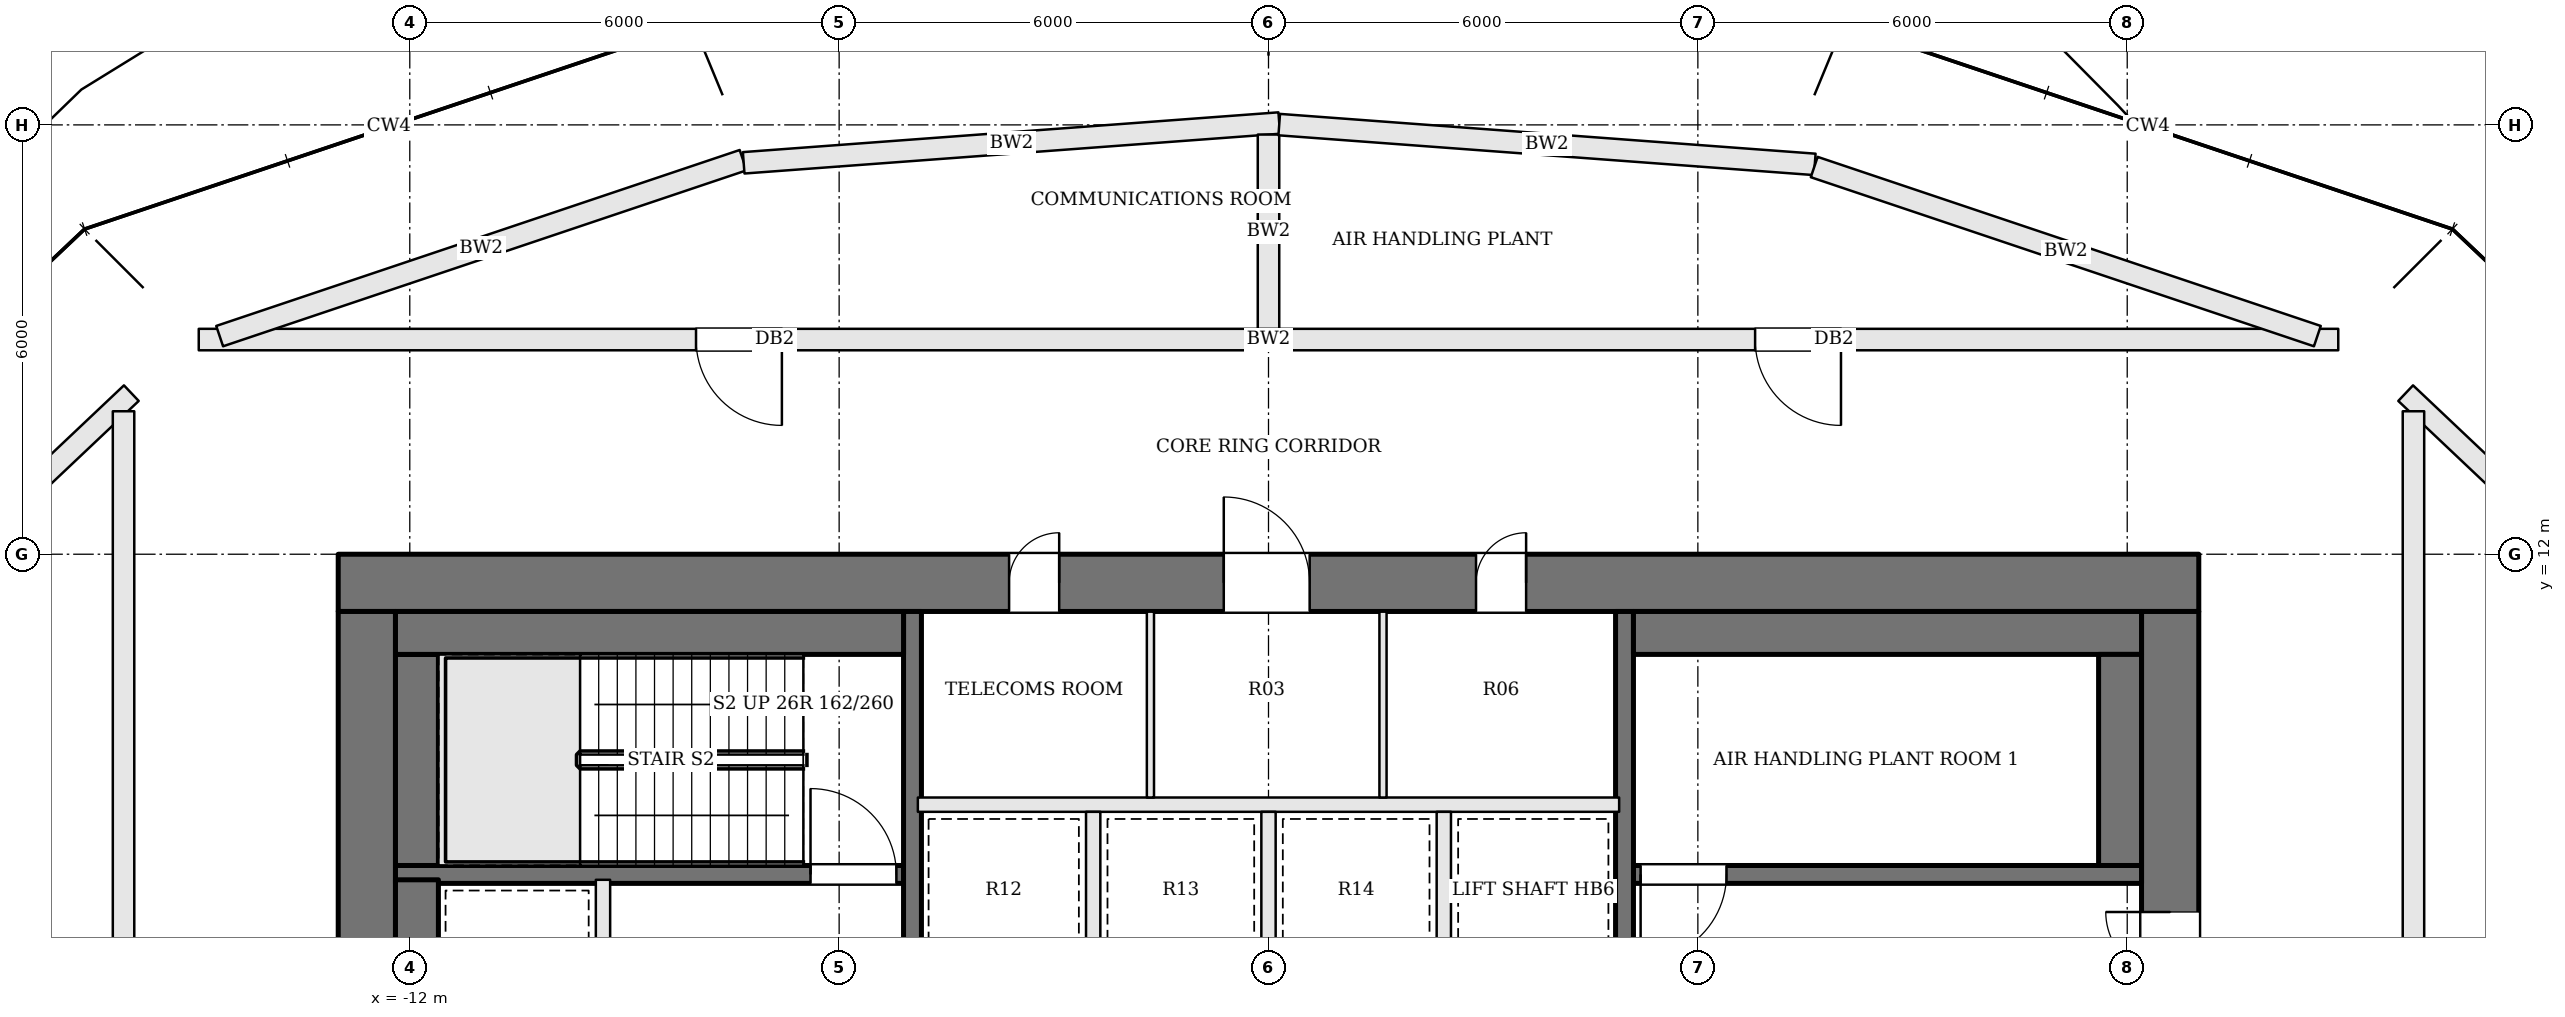
"""IFC4 building model, lengths in metres.
Left out: names, types, materials, properties, quantities, classifications, styles, units other than length and angle.
Written with IfcOpenShell. Run it as: python <this file> out.ifc"""

import sys

from ifc_helpers import new_model, si_unit, direction, frame, frame_2d, origin, place, context, subcontext, project, spatial, rectangle, extrude, element, fill, save


model = new_model("IFC4")
c1 = context("Model", 3, precision=1e-05, world=origin(), true_north=direction((0.0, 1.0)))
c2 = subcontext(c1, "Body", "Model", "MODEL_VIEW")
j1 = project(units=[si_unit("LENGTHUNIT", "METRE"), si_unit("PLANEANGLEUNIT", "RADIAN")], contexts=[c1])
p1 = place(None, origin())
s1 = spatial("IfcSite", under=j1, at=p1, CompositionType="ELEMENT")
p2 = place(p1, origin())
s2 = spatial("IfcBuilding", under=s1, at=p2, CompositionType="ELEMENT")
p3 = place(p2, frame((0.0, 0.0, 307.8)))
s3 = spatial("IfcBuildingStorey", under=s2, at=p3, CompositionType="ELEMENT", Elevation=307.8)
p4 = place(p3, frame((-13.0, 11.6, 0.0), z_axis=(0.0, 0.0, 1.0), x_axis=(1.0, 0.0, 0.0)))
e1 = element("IfcWall", 1, at=p4, inside=s3, PredefinedType="SHEAR", context=c2, shape_type="SweptSolid", body=[
    extrude(rectangle(XDim=26.0, YDim=0.8, at=frame_2d((13.0, 0.0))), origin(), (0.0, 0.0, 1.0), 4.2),
])
p5 = place(p4, frame((9.375, 0.0, 0.0)))
e2 = element("IfcOpeningElement", 2, at=p5, cuts=e1, PredefinedType="OPENING", context=c2, shape_type="SweptSolid", body=[
    extrude(rectangle(XDim=0.7, YDim=2.1, at=frame_2d((0.35, 1.05))), frame((0.0, 0.41, 0.0), z_axis=(0.0, -1.0, 0.0), x_axis=(1.0, 0.0, 0.0)), (0.0, 0.0, 1.0), 0.82),
])
p6 = place(p4, frame((12.375, 0.0, 0.0)))
e3 = element("IfcOpeningElement", 3, at=p6, cuts=e1, PredefinedType="OPENING", context=c2, shape_type="SweptSolid", body=[
    extrude(rectangle(XDim=1.2, YDim=2.1, at=frame_2d((0.6, 1.05))), frame((0.0, 0.41, 0.0), z_axis=(0.0, -1.0, 0.0), x_axis=(1.0, 0.0, 0.0)), (0.0, 0.0, 1.0), 0.82),
])
p7 = place(p4, frame((15.9, 0.0, 0.0)))
e4 = element("IfcOpeningElement", 4, at=p7, cuts=e1, PredefinedType="OPENING", context=c2, shape_type="SweptSolid", body=[
    extrude(rectangle(XDim=0.7, YDim=2.1, at=frame_2d((0.35, 1.05))), frame((0.0, 0.41, 0.0), z_axis=(0.0, -1.0, 0.0), x_axis=(1.0, 0.0, 0.0)), (0.0, 0.0, 1.0), 0.82),
])
p8 = place(p3, frame((12.6, -2.2, 0.0), z_axis=(0.0, 0.0, 1.0), x_axis=(0.0, 1.0, 0.0)))
e5 = element("IfcWall", 5, at=p8, inside=s3, PredefinedType="SHEAR", context=c2, shape_type="SweptSolid", body=[
    extrude(rectangle(XDim=13.4, YDim=0.8, at=frame_2d((6.7, 0.0))), origin(), (0.0, 0.0, 1.0), 4.2),
])
p9 = place(p8, frame((7.4, 0.0, 0.0)))
e6 = element("IfcOpeningElement", 6, at=p9, cuts=e5, PredefinedType="OPENING", context=c2, shape_type="SweptSolid", body=[
    extrude(rectangle(XDim=1.8, YDim=2.1, at=frame_2d((0.9, 1.05))), frame((0.0, 0.41, 0.0), z_axis=(0.0, -1.0, 0.0), x_axis=(1.0, 0.0, 0.0)), (0.0, 0.0, 1.0), 0.82),
])
p10 = place(p3, frame((-12.6, -2.2, 0.0), z_axis=(0.0, 0.0, 1.0), x_axis=(0.0, 1.0, 0.0)))
e7 = element("IfcWall", 7, at=p10, inside=s3, PredefinedType="SHEAR", context=c2, shape_type="SweptSolid", body=[
    extrude(rectangle(XDim=13.4, YDim=0.8, at=frame_2d((6.7, 0.0))), origin(), (0.0, 0.0, 1.0), 4.2),
])
p11 = place(p10, frame((4.2, 0.0, 0.0)))
e8 = element("IfcOpeningElement", 8, at=p11, cuts=e7, PredefinedType="OPENING", context=c2, shape_type="SweptSolid", body=[
    extrude(rectangle(XDim=1.8, YDim=2.1, at=frame_2d((0.9, 1.05))), frame((0.0, 0.41, 0.0), z_axis=(0.0, -1.0, 0.0), x_axis=(1.0, 0.0, 0.0)), (0.0, 0.0, 1.0), 0.82),
])
p12 = place(p3, frame((12.2, 7.525, 0.0), z_axis=(0.0, 0.0, 1.0), x_axis=(-1.0, 0.0, 0.0)))
e9 = element("IfcWall", 9, at=p12, inside=s3, PredefinedType="SOLIDWALL", context=c2, shape_type="SweptSolid", body=[
    extrude(rectangle(XDim=7.1, YDim=0.25, at=frame_2d((3.55, 0.0))), origin(), (0.0, 0.0, 1.0), 4.0),
])
p13 = place(p12, frame((5.8, 0.0, 0.0)))
e10 = element("IfcOpeningElement", 10, at=p13, cuts=e9, PredefinedType="OPENING", context=c2, shape_type="SweptSolid", body=[
    extrude(rectangle(XDim=1.2, YDim=2.1, at=frame_2d((0.6, 1.05))), frame((0.0, 0.135, 0.0), z_axis=(0.0, -1.0, 0.0), x_axis=(1.0, 0.0, 0.0)), (0.0, 0.0, 1.0), 0.27),
])
p14 = place(p3, frame((-12.2, 7.525, 0.0), z_axis=(0.0, 0.0, 1.0), x_axis=(1.0, 0.0, 0.0)))
e11 = element("IfcWall", 11, at=p14, inside=s3, PredefinedType="SOLIDWALL", context=c2, shape_type="SweptSolid", body=[
    extrude(rectangle(XDim=7.1, YDim=0.25, at=frame_2d((3.55, 0.0))), origin(), (0.0, 0.0, 1.0), 4.0),
])
p15 = place(p14, frame((5.8, 0.0, 0.0)))
e12 = element("IfcOpeningElement", 12, at=p15, cuts=e11, PredefinedType="OPENING", context=c2, shape_type="SweptSolid", body=[
    extrude(rectangle(XDim=1.2, YDim=2.1, at=frame_2d((0.6, 1.05))), frame((0.0, 0.135, 0.0), z_axis=(0.0, -1.0, 0.0), x_axis=(1.0, 0.0, 0.0)), (0.0, 0.0, 1.0), 0.27),
])
p16 = place(p3, frame((-9.3, 4.45, 0.0), z_axis=(0.0, 0.0, 1.0), x_axis=(0.0, 1.0, 0.0)))
e13 = element("IfcWall", 13, at=p16, inside=s3, PredefinedType="SOLIDWALL", context=c2, shape_type="SweptSolid", body=[
    extrude(rectangle(XDim=3.0, YDim=0.2, at=frame_2d((1.5, 0.0))), origin(), (0.0, 0.0, 1.0), 4.0),
])
p17 = place(p3, frame((-4.975, -2.2, 0.0), z_axis=(0.0, 0.0, 1.0), x_axis=(0.0, 1.0, 0.0)))
e14 = element("IfcWall", 14, at=p17, inside=s3, PredefinedType="SOLIDWALL", context=c2, shape_type="SweptSolid", body=[
    extrude(rectangle(XDim=13.4, YDim=0.25, at=frame_2d((6.7, 0.0))), origin(), (0.0, 0.0, 1.0), 4.0),
])
p18 = place(p17, frame((5.25, 0.0, 0.0)))
e15 = element("IfcOpeningElement", 15, at=p18, cuts=e14, PredefinedType="OPENING", context=c2, shape_type="SweptSolid", body=[
    extrude(rectangle(XDim=1.2, YDim=2.1, at=frame_2d((0.6, 1.05))), frame((0.0, 0.135, 0.0), z_axis=(0.0, -1.0, 0.0), x_axis=(1.0, 0.0, 0.0)), (0.0, 0.0, 1.0), 0.27),
])
p19 = place(p3, frame((4.975, 11.2, 0.0), z_axis=(0.0, 0.0, 1.0), x_axis=(0.0, -1.0, 0.0)))
e16 = element("IfcWall", 16, at=p19, inside=s3, PredefinedType="SOLIDWALL", context=c2, shape_type="SweptSolid", body=[
    extrude(rectangle(XDim=13.4, YDim=0.25, at=frame_2d((6.7, 0.0))), origin(), (0.0, 0.0, 1.0), 4.0),
])
p20 = place(p19, frame((5.25, 0.0, 0.0)))
e17 = element("IfcOpeningElement", 17, at=p20, cuts=e16, PredefinedType="OPENING", context=c2, shape_type="SweptSolid", body=[
    extrude(rectangle(XDim=1.2, YDim=2.1, at=frame_2d((0.6, 1.05))), frame((0.0, 0.135, 0.0), z_axis=(0.0, -1.0, 0.0), x_axis=(1.0, 0.0, 0.0)), (0.0, 0.0, 1.0), 0.27),
])
p21 = place(p3, frame((-11.9, 4.45, 0.0), z_axis=(0.0, 0.0, 1.0), x_axis=(0.0, 1.0, 0.0)))
e18 = element("IfcWall", 18, at=p21, inside=s3, PredefinedType="SOLIDWALL", context=c2, shape_type="SweptSolid", body=[
    extrude(rectangle(XDim=3.0, YDim=0.6, at=frame_2d((1.5, 0.0))), origin(), (0.0, 0.0, 1.0), 4.0),
])
p22 = place(p3, frame((-11.9, 7.65, 0.0), z_axis=(0.0, 0.0, 1.0), x_axis=(0.0, 1.0, 0.0)))
e19 = element("IfcWall", 19, at=p22, inside=s3, PredefinedType="SOLIDWALL", context=c2, shape_type="SweptSolid", body=[
    extrude(rectangle(XDim=2.95, YDim=0.6, at=frame_2d((1.475, 0.0))), origin(), (0.0, 0.0, 1.0), 4.0),
])
for number, where, z_axis, x_axis in (
    (20, (-12.2, 10.9, 0.0), (0.0, 0.0, 1.0), (1.0, 0.0, 0.0)),
    (21, (12.2, 10.9, 0.0), (0.0, 0.0, 1.0), (-1.0, 0.0, 0.0)),
):
    element("IfcWall", number, at=place(p3, frame(where, z_axis=z_axis, x_axis=x_axis)), inside=s3, PredefinedType="SOLIDWALL", context=c2, shape_type="SweptSolid", body=[
        extrude(rectangle(XDim=7.1, YDim=0.6, at=frame_2d((3.55, 0.0))), origin(), (0.0, 0.0, 1.0), 4.0),
    ])
p23 = place(p3, frame((11.9, 10.6, 0.0), z_axis=(0.0, 0.0, 1.0), x_axis=(0.0, -1.0, 0.0)))
e22 = element("IfcWall", 22, at=p23, inside=s3, PredefinedType="SOLIDWALL", context=c2, shape_type="SweptSolid", body=[
    extrude(rectangle(XDim=2.95, YDim=0.6, at=frame_2d((1.475, 0.0))), origin(), (0.0, 0.0, 1.0), 4.0),
])
p24 = place(p3, frame((-4.9, 8.5, 0.0), z_axis=(0.0, 0.0, 1.0), x_axis=(1.0, 0.0, 0.0)))
e23 = element("IfcWall", 23, at=p24, inside=s3, PredefinedType="SOLIDWALL", context=c2, shape_type="SweptSolid", body=[
    extrude(rectangle(XDim=9.8, YDim=0.2, at=frame_2d((4.9, 0.0))), origin(), (0.0, 0.0, 1.0), 4.0),
])
for number, where, z_axis, x_axis in (
    (24, (-2.45, 6.2, 0.0), (0.0, 0.0, 1.0), (0.0, 1.0, 0.0)),
    (25, (0.0, 6.2, 0.0), (0.0, 0.0, 1.0), (0.0, 1.0, 0.0)),
    (26, (2.45, 6.2, 0.0), (0.0, 0.0, 1.0), (0.0, 1.0, 0.0)),
):
    element("IfcWall", number, at=place(p3, frame(where, z_axis=z_axis, x_axis=x_axis)), inside=s3, PredefinedType="SOLIDWALL", context=c2, shape_type="SweptSolid", body=[
        extrude(rectangle(XDim=2.2, YDim=0.2, at=frame_2d((1.1, 0.0))), origin(), (0.0, 0.0, 1.0), 4.0),
    ])
for number, where, z_axis, x_axis in (
    (27, (-1.65, 8.6, 0.0), (0.0, 0.0, 1.0), (0.0, 1.0, 0.0)),
    (28, (1.6, 8.6, 0.0), (0.0, 0.0, 1.0), (0.0, 1.0, 0.0)),
):
    element("IfcWall", number, at=place(p3, frame(where, z_axis=z_axis, x_axis=x_axis)), inside=s3, PredefinedType="PARTITIONING", context=c2, shape_type="SweptSolid", body=[
        extrude(rectangle(XDim=2.6, YDim=0.1, at=frame_2d((1.3, 0.0))), origin(), (0.0, 0.0, 1.0), 4.0),
    ])
p25 = place(p3, frame((-21.552, 8.899, 0.0), z_axis=(0.0, 0.0, 1.0), x_axis=(0.726650636751, 0.687007170348, 0.0)))
e29 = element("IfcWall", 29, at=p25, inside=s3, PredefinedType="SOLIDWALL", context=c2, shape_type="SweptSolid", body=[
    extrude(rectangle(XDim=7.79, YDim=0.3, at=frame_2d((3.895, 0.0))), origin(), (0.0, 0.0, 1.0), 3.484),
])
p26 = place(p3, frame((-16.0, 13.998, 0.0), z_axis=(0.0, 0.0, 1.0), x_axis=(0.0, -1.0, 0.0)))
e30 = element("IfcWall", 30, at=p26, inside=s3, PredefinedType="SOLIDWALL", context=c2, shape_type="SweptSolid", body=[
    extrude(rectangle(XDim=19.848, YDim=0.3, at=frame_2d((9.924, 0.0))), origin(), (0.0, 0.0, 1.0), 3.484),
])
p27 = place(p26, frame((8.998, 0.0, 0.0)))
e31 = element("IfcOpeningElement", 31, at=p27, cuts=e30, PredefinedType="OPENING", context=c2, shape_type="SweptSolid", body=[
    extrude(rectangle(XDim=1.0, YDim=2.1, at=frame_2d((0.5, 1.05))), frame((0.0, 0.16, 0.0), z_axis=(0.0, -1.0, 0.0), x_axis=(1.0, 0.0, 0.0)), (0.0, 0.0, 1.0), 0.32),
])
p28 = place(p3, frame((15.891, 14.251, 0.0), z_axis=(0.0, 0.0, 1.0), x_axis=(0.726669936256, -0.686986756598, 0.0)))
e32 = element("IfcWall", 32, at=p28, inside=s3, PredefinedType="SOLIDWALL", context=c2, shape_type="SweptSolid", body=[
    extrude(rectangle(XDim=8.09, YDim=0.3, at=frame_2d((4.045, 0.0))), origin(), (0.0, 0.0, 1.0), 3.484),
])
p29 = place(p3, frame((16.0, -5.85, 0.0), z_axis=(0.0, 0.0, 1.0), x_axis=(0.0, 1.0, 0.0)))
e33 = element("IfcWall", 33, at=p29, inside=s3, PredefinedType="SOLIDWALL", context=c2, shape_type="SweptSolid", body=[
    extrude(rectangle(XDim=19.848, YDim=0.3, at=frame_2d((9.924, 0.0))), origin(), (0.0, 0.0, 1.0), 3.484),
])
p30 = place(p29, frame((9.85, 0.0, 0.0)))
e34 = element("IfcOpeningElement", 34, at=p30, cuts=e33, PredefinedType="OPENING", context=c2, shape_type="SweptSolid", body=[
    extrude(rectangle(XDim=1.0, YDim=2.1, at=frame_2d((0.5, 1.05))), frame((0.0, 0.16, 0.0), z_axis=(0.0, -1.0, 0.0), x_axis=(1.0, 0.0, 0.0)), (0.0, 0.0, 1.0), 0.32),
])
p31 = place(p3, frame((14.949, 15.0, 0.0), z_axis=(0.0, 0.0, 1.0), x_axis=(-1.0, 0.0, 0.0)))
e35 = element("IfcWall", 35, at=p31, inside=s3, PredefinedType="SOLIDWALL", context=c2, shape_type="SweptSolid", body=[
    extrude(rectangle(XDim=29.898, YDim=0.3, at=frame_2d((14.949, 0.0))), origin(), (0.0, 0.0, 1.0), 3.484),
])
p32 = place(p31, frame((21.749, 0.0, 0.0)))
e36 = element("IfcOpeningElement", 36, at=p32, cuts=e35, PredefinedType="OPENING", context=c2, shape_type="SweptSolid", body=[
    extrude(rectangle(XDim=1.2, YDim=2.1, at=frame_2d((0.6, 1.05))), frame((0.0, 0.16, 0.0), z_axis=(0.0, -1.0, 0.0), x_axis=(1.0, 0.0, 0.0)), (0.0, 0.0, 1.0), 0.32),
])
p33 = place(p31, frame((6.949, 0.0, 0.0)))
e37 = element("IfcOpeningElement", 37, at=p33, cuts=e35, PredefinedType="OPENING", context=c2, shape_type="SweptSolid", body=[
    extrude(rectangle(XDim=1.2, YDim=2.1, at=frame_2d((0.6, 1.05))), frame((0.0, 0.16, 0.0), z_axis=(0.0, -1.0, 0.0), x_axis=(1.0, 0.0, 0.0)), (0.0, 0.0, 1.0), 0.32),
])
p34 = place(p3, frame((-14.657, 15.048, 0.0), z_axis=(0.0, 0.0, 1.0), x_axis=(0.947876681806, 0.318637405352, 0.0)))
e38 = element("IfcWall", 38, at=p34, inside=s3, PredefinedType="SOLIDWALL", context=c2, shape_type="SweptSolid", body=[
    extrude(rectangle(XDim=7.717, YDim=0.3, at=frame_2d((3.859, 0.0))), origin(), (0.0, 0.0, 1.0), 3.484),
])
p35 = place(p3, frame((-7.334, 17.47, 0.0), z_axis=(0.0, 0.0, 1.0), x_axis=(0.99725255451, 0.074076599028, 0.0)))
e39 = element("IfcWall", 39, at=p35, inside=s3, PredefinedType="SOLIDWALL", context=c2, shape_type="SweptSolid", body=[
    extrude(rectangle(XDim=7.504, YDim=0.3, at=frame_2d((3.752, 0.0))), origin(), (0.0, 0.0, 1.0), 3.484),
])
p36 = place(p3, frame((0.0, 17.865, 0.0), z_axis=(0.0, 0.0, 1.0), x_axis=(0.0, -1.0, 0.0)))
e40 = element("IfcWall", 40, at=p36, inside=s3, PredefinedType="SOLIDWALL", context=c2, shape_type="SweptSolid", body=[
    extrude(rectangle(XDim=2.715, YDim=0.3, at=frame_2d((1.357, 0.0))), origin(), (0.0, 0.0, 1.0), 3.484),
])
p37 = place(p3, frame((0.15, 18.004, 0.0), z_axis=(0.0, 0.0, 1.0), x_axis=(0.997252733018, -0.074074195827, 0.0)))
e41 = element("IfcWall", 41, at=p37, inside=s3, PredefinedType="SOLIDWALL", context=c2, shape_type="SweptSolid", body=[
    extrude(rectangle(XDim=7.505, YDim=0.3, at=frame_2d((3.752, 0.0))), origin(), (0.0, 0.0, 1.0), 3.484),
])
p38 = place(p3, frame((7.626, 17.411, 0.0), z_axis=(0.0, 0.0, 1.0), x_axis=(0.947906967492, -0.318547297871, 0.0)))
e42 = element("IfcWall", 42, at=p38, inside=s3, PredefinedType="SOLIDWALL", context=c2, shape_type="SweptSolid", body=[
    extrude(rectangle(XDim=7.417, YDim=0.3, at=frame_2d((3.709, 0.0))), origin(), (0.0, 0.0, 1.0), 3.484),
])
p39 = place(p9, origin())
e43 = element("IfcDoor", 43, at=p39, inside=s3, OperationType="DOUBLE_DOOR_SINGLE_SWING", PredefinedType="DOOR", context=c2, shape_type="SweptSolid", body=[
    extrude(rectangle(XDim=1.8, YDim=2.1, at=frame_2d((0.9, 1.05))), frame((0.0, 0.025, 0.0), z_axis=(0.0, -1.0, 0.0), x_axis=(1.0, 0.0, 0.0)), (0.0, 0.0, 1.0), 0.05),
])
fill(e6, e43)
p40 = place(p13, origin())
e44 = element("IfcDoor", 44, at=p40, inside=s3, OperationType="SINGLE_SWING_RIGHT", PredefinedType="DOOR", context=c2, shape_type="SweptSolid", body=[
    extrude(rectangle(XDim=1.2, YDim=2.1, at=frame_2d((0.6, 1.05))), frame((0.0, 0.025, 0.0), z_axis=(0.0, -1.0, 0.0), x_axis=(1.0, 0.0, 0.0)), (0.0, 0.0, 1.0), 0.05),
])
fill(e10, e44)
p41 = place(p15, origin())
e45 = element("IfcDoor", 45, at=p41, inside=s3, OperationType="SINGLE_SWING_LEFT", PredefinedType="DOOR", context=c2, shape_type="SweptSolid", body=[
    extrude(rectangle(XDim=1.2, YDim=2.1, at=frame_2d((0.6, 1.05))), frame((0.0, 0.025, 0.0), z_axis=(0.0, -1.0, 0.0), x_axis=(1.0, 0.0, 0.0)), (0.0, 0.0, 1.0), 0.05),
])
fill(e12, e45)
p42 = place(p5, origin())
e46 = element("IfcDoor", 46, at=p42, inside=s3, OperationType="SINGLE_SWING_RIGHT", PredefinedType="DOOR", context=c2, shape_type="SweptSolid", body=[
    extrude(rectangle(XDim=0.7, YDim=2.1, at=frame_2d((0.35, 1.05))), frame((0.0, 0.025, 0.0), z_axis=(0.0, -1.0, 0.0), x_axis=(1.0, 0.0, 0.0)), (0.0, 0.0, 1.0), 0.05),
])
fill(e2, e46)
p43 = place(p6, origin())
e47 = element("IfcDoor", 47, at=p43, inside=s3, OperationType="SINGLE_SWING_LEFT", PredefinedType="DOOR", context=c2, shape_type="SweptSolid", body=[
    extrude(rectangle(XDim=1.2, YDim=2.1, at=frame_2d((0.6, 1.05))), frame((0.0, 0.025, 0.0), z_axis=(0.0, -1.0, 0.0), x_axis=(1.0, 0.0, 0.0)), (0.0, 0.0, 1.0), 0.05),
])
fill(e3, e47)
p44 = place(p7, origin())
e48 = element("IfcDoor", 48, at=p44, inside=s3, OperationType="SINGLE_SWING_RIGHT", PredefinedType="DOOR", context=c2, shape_type="SweptSolid", body=[
    extrude(rectangle(XDim=0.7, YDim=2.1, at=frame_2d((0.35, 1.05))), frame((0.0, 0.025, 0.0), z_axis=(0.0, -1.0, 0.0), x_axis=(1.0, 0.0, 0.0)), (0.0, 0.0, 1.0), 0.05),
])
fill(e4, e48)
p45 = place(p32, origin())
e49 = element("IfcDoor", 49, at=p45, inside=s3, OperationType="SINGLE_SWING_LEFT", PredefinedType="DOOR", context=c2, shape_type="SweptSolid", body=[
    extrude(rectangle(XDim=1.2, YDim=2.1, at=frame_2d((0.6, 1.05))), frame((0.0, 0.025, 0.0), z_axis=(0.0, -1.0, 0.0), x_axis=(1.0, 0.0, 0.0)), (0.0, 0.0, 1.0), 0.05),
])
fill(e36, e49)
p46 = place(p33, origin())
e50 = element("IfcDoor", 50, at=p46, inside=s3, OperationType="SINGLE_SWING_LEFT", PredefinedType="DOOR", context=c2, shape_type="SweptSolid", body=[
    extrude(rectangle(XDim=1.2, YDim=2.1, at=frame_2d((0.6, 1.05))), frame((0.0, 0.025, 0.0), z_axis=(0.0, -1.0, 0.0), x_axis=(1.0, 0.0, 0.0)), (0.0, 0.0, 1.0), 0.05),
])
fill(e37, e50)
save(model, sys.argv[1])
